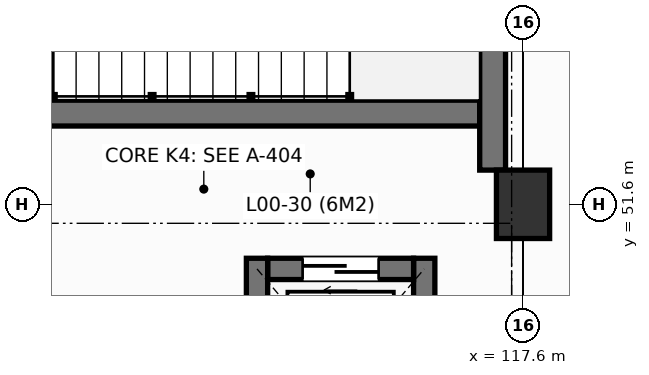
"""IFC4 building model, lengths in metres.
Left out: names, types, materials, properties, quantities, classifications, styles, units other than length and angle.
Written with IfcOpenShell. Run it as: python <this file> out.ifc"""

import sys

from ifc_helpers import new_model, si_unit, direction, frame, frame_2d, origin, origin_2d, place, context, subcontext, project, spatial, rectangle, extrude, element, fill, save


model = new_model("IFC4")
c1 = context("Model", 3, precision=1e-05, world=origin(), true_north=direction((0.0, 1.0)))
c2 = subcontext(c1, "Body", "Model", "MODEL_VIEW")
j1 = project(units=[si_unit("LENGTHUNIT", "METRE"), si_unit("PLANEANGLEUNIT", "RADIAN")], contexts=[c1])
p1 = place(None, origin())
s1 = spatial("IfcSite", under=j1, at=p1, CompositionType="ELEMENT")
p2 = place(p1, origin())
s2 = spatial("IfcBuilding", under=s1, at=p2, CompositionType="ELEMENT")
p3 = place(p2, origin())
s3 = spatial("IfcBuildingStorey", under=s2, at=p3, CompositionType="ELEMENT", Elevation=0.0)
p4 = place(p3, frame((117.6, 51.6, 0.0), z_axis=(0.0, 0.0, 1.0), x_axis=(1.0, 0.0, 0.0)))
e1 = element("IfcColumn", 1, at=p4, inside=s3, PredefinedType="COLUMN", context=c2, shape_type="SweptSolid", body=[
    extrude(rectangle(XDim=0.7, YDim=0.9, at=origin_2d()), origin(), (0.0, 0.0, 1.0), 4.8),
])
p5 = place(p3, frame((109.77, 52.8, 0.0), z_axis=(0.0, 0.0, 1.0), x_axis=(1.0, 0.0, 0.0)))
e2 = element("IfcWall", 2, at=p5, inside=s3, PredefinedType="SHEAR", context=c2, shape_type="SweptSolid", body=[
    extrude(rectangle(XDim=7.26, YDim=0.34, at=frame_2d((3.63, 0.0))), origin(), (0.0, 0.0, 1.0), 4.8),
])
p6 = place(p3, frame((117.2, 52.05, 0.0), z_axis=(0.0, 0.0, 1.0), x_axis=(0.0, 1.0, 0.0)))
e3 = element("IfcWall", 3, at=p6, inside=s3, PredefinedType="SHEAR", context=c2, shape_type="SweptSolid", body=[
    extrude(rectangle(XDim=4.76, YDim=0.34, at=frame_2d((2.38, 0.0))), origin(), (0.0, 0.0, 1.0), 4.8),
])
p7 = place(p3, frame((116.3, 48.01, 0.0), z_axis=(0.0, 0.0, 1.0), x_axis=(0.0, 1.0, 0.0)))
e4 = element("IfcWall", 4, at=p7, inside=s3, PredefinedType="SHEAR", context=c2, shape_type="SweptSolid", body=[
    extrude(rectangle(XDim=2.88, YDim=0.28, at=frame_2d((1.44, 0.0))), origin(), (0.0, 0.0, 1.0), 4.8),
])
p8 = place(p3, frame((116.16, 50.75, 0.0), z_axis=(0.0, 0.0, 1.0), x_axis=(-1.0, 0.0, 0.0)))
e5 = element("IfcWall", 5, at=p8, inside=s3, PredefinedType="SHEAR", context=c2, shape_type="SweptSolid", body=[
    extrude(rectangle(XDim=1.92, YDim=0.28, at=frame_2d((0.96, 0.0))), origin(), (0.0, 0.0, 1.0), 4.8),
])
p9 = place(p8, frame((0.46, 0.0, 0.0)))
e6 = element("IfcOpeningElement", 6, at=p9, cuts=e5, PredefinedType="OPENING", context=c2, shape_type="SweptSolid", body=[
    extrude(rectangle(XDim=1.0, YDim=2.15, at=frame_2d((0.5, 1.075))), frame((0.0, 0.15, 0.0), z_axis=(0.0, -1.0, 0.0), x_axis=(1.0, 0.0, 0.0)), (0.0, 0.0, 1.0), 0.3),
])
p10 = place(p3, frame((114.1, 50.89, 0.0), z_axis=(0.0, 0.0, 1.0), x_axis=(0.0, -1.0, 0.0)))
e7 = element("IfcWall", 7, at=p10, inside=s3, PredefinedType="SHEAR", context=c2, shape_type="SweptSolid", body=[
    extrude(rectangle(XDim=2.88, YDim=0.28, at=frame_2d((1.44, 0.0))), origin(), (0.0, 0.0, 1.0), 4.8),
])
p11 = place(p9, origin())
e8 = element("IfcDoor", 8, at=p11, inside=s3, OperationType="SLIDING_TO_RIGHT", PredefinedType="DOOR", context=c2, shape_type="SweptSolid", body=[
    extrude(rectangle(XDim=1.0, YDim=2.15, at=frame_2d((0.5, 1.075))), frame((0.0, 0.025, 0.0), z_axis=(0.0, -1.0, 0.0), x_axis=(1.0, 0.0, 0.0)), (0.0, 0.0, 1.0), 0.05),
])
fill(e6, e8)
save(model, sys.argv[1])
